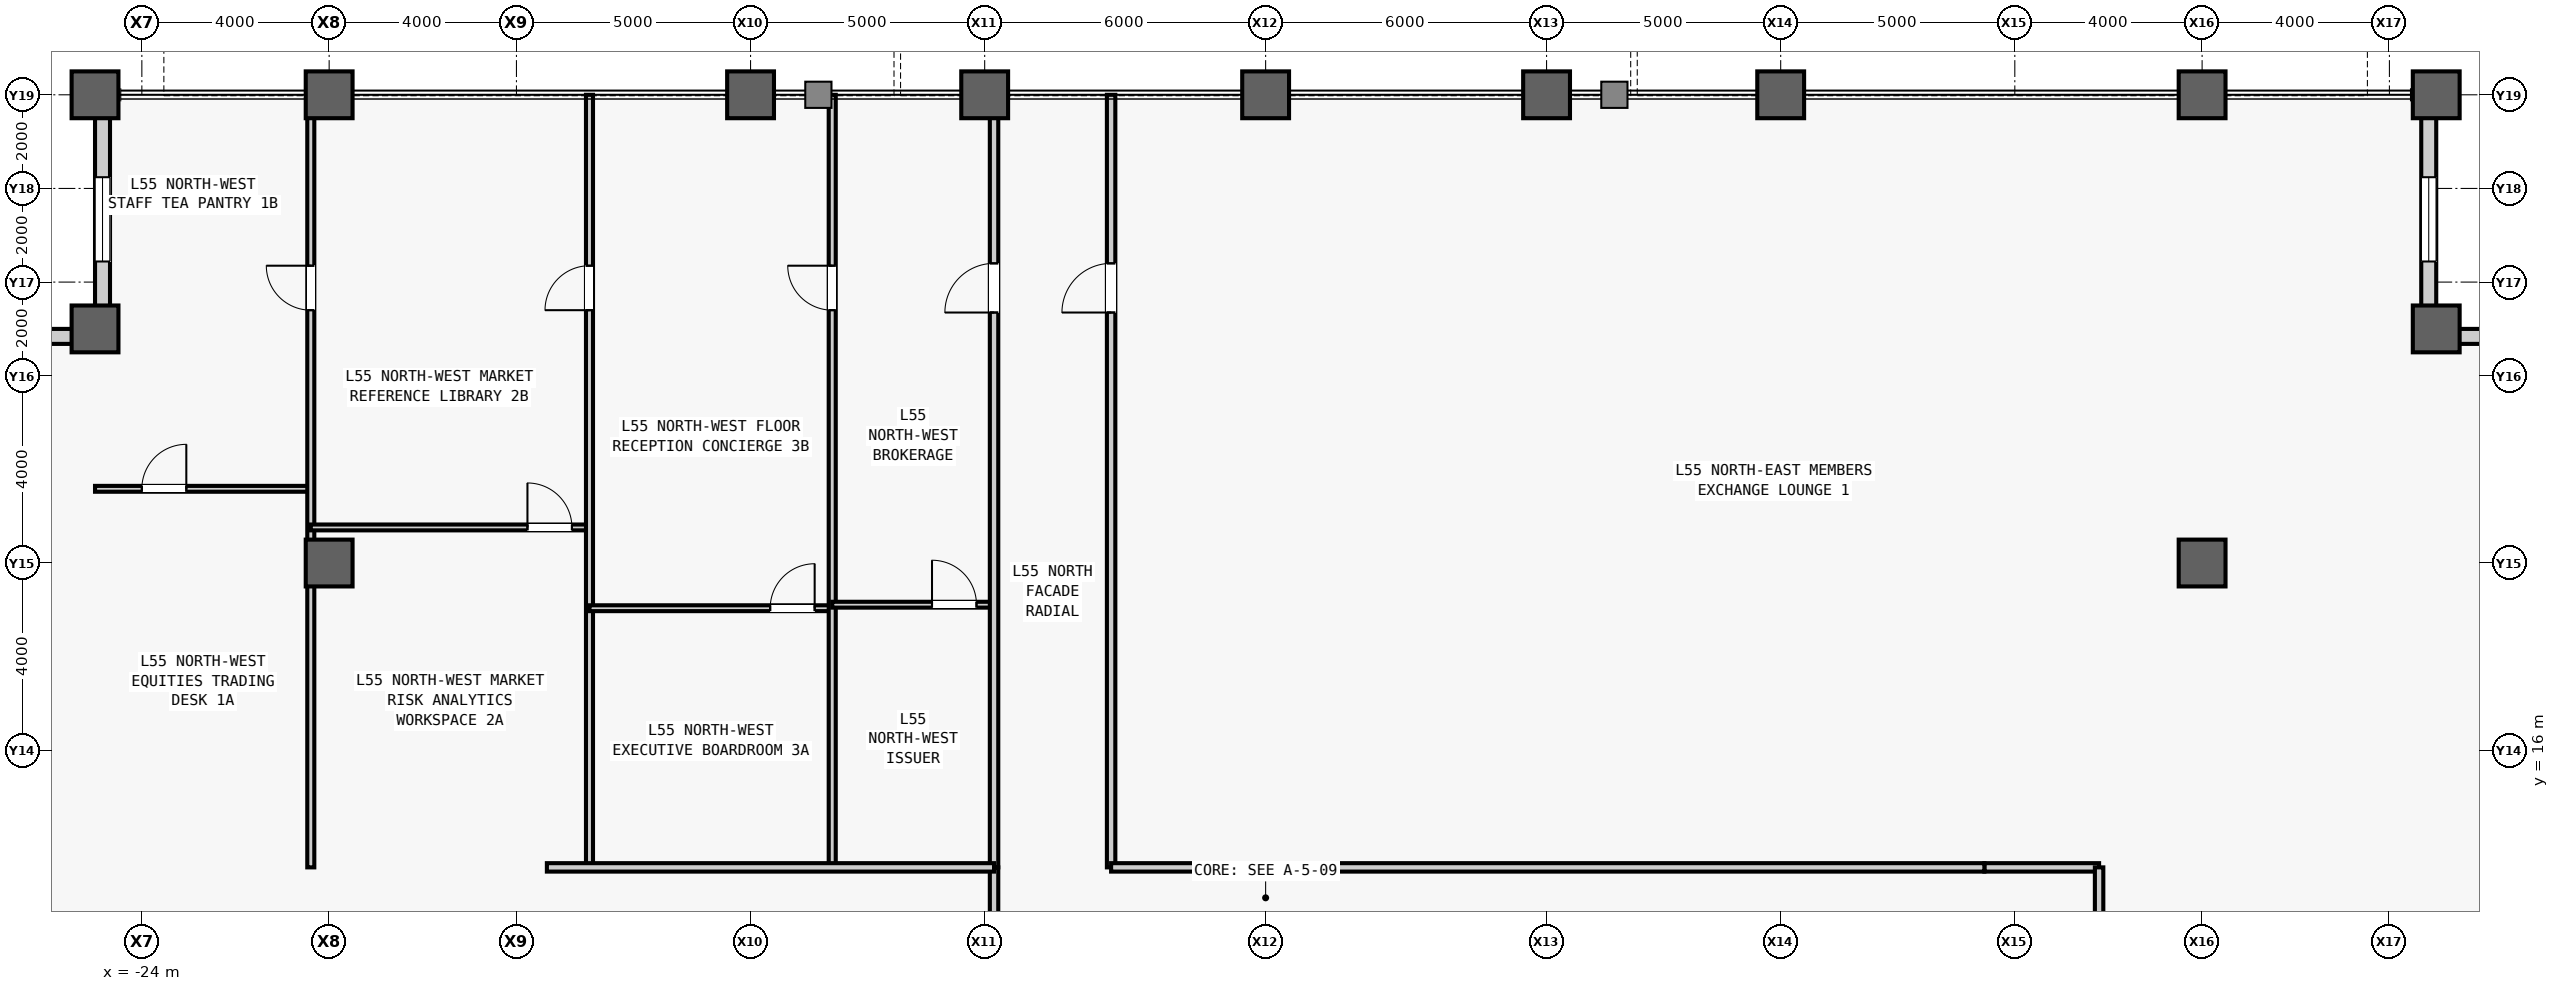
"""IFC4 building model, lengths in metres.
Left out: names, types, materials, properties, quantities, classifications, styles, units other than length and angle.
Written with IfcOpenShell. Run it as: python <this file> out.ifc"""

import sys

from ifc_helpers import new_model, si_unit, direction, frame, frame_2d, origin, origin_2d, place, context, subcontext, project, spatial, rectangle, hollow_rectangle, extrude, source, transform, mapped, element, fill, save


model = new_model("IFC4")
c1 = context("Model", 3, precision=1e-05, world=origin(), true_north=direction((0.0, 1.0)))
c2 = subcontext(c1, "Body", "Model", "MODEL_VIEW")
j1 = project(units=[si_unit("LENGTHUNIT", "METRE"), si_unit("PLANEANGLEUNIT", "RADIAN")], contexts=[c1])
p1 = place(None, origin())
s1 = spatial("IfcSite", under=j1, at=p1, CompositionType="ELEMENT")
p2 = place(p1, origin())
s2 = spatial("IfcBuilding", under=s1, at=p2, CompositionType="ELEMENT")
p3 = place(p2, frame((0.0, 0.0, 235.1)))
s3 = spatial("IfcBuildingStorey", under=s2, at=p3, CompositionType="ELEMENT", Elevation=235.1)
m1 = source(origin(), c2, "Body", "SweptSolid", [
    extrude(hollow_rectangle(XDim=1.0, YDim=1.0, WallThickness=0.055, at=origin_2d()), origin(), (0.0, 0.0, 1.0), 4.0),
])
for number, where, z_axis, x_axis in (
    (1, (-25.0, 25.0, 0.0), (0.0, 0.0, 1.0), (1.0, 0.0, 0.0)),
    (2, (-25.0, 30.0, 0.0), (0.0, 0.0, 1.0), (1.0, 0.0, 0.0)),
    (3, (-20.0, 20.0, 0.0), (0.0, 0.0, 1.0), (1.0, 0.0, 0.0)),
    (4, (-20.0, 30.0, 0.0), (0.0, 0.0, 1.0), (1.0, 0.0, 0.0)),
    (5, (-11.0, 30.0, 0.0), (0.0, 0.0, 1.0), (1.0, 0.0, 0.0)),
    (6, (-6.0, 30.0, 0.0), (0.0, 0.0, 1.0), (1.0, 0.0, 0.0)),
    (7, (0.0, 30.0, 0.0), (0.0, 0.0, 1.0), (1.0, 0.0, 0.0)),
    (8, (6.0, 30.0, 0.0), (0.0, 0.0, 1.0), (1.0, 0.0, 0.0)),
    (9, (11.0, 30.0, 0.0), (0.0, 0.0, 1.0), (1.0, 0.0, 0.0)),
    (10, (20.0, 20.0, 0.0), (0.0, 0.0, 1.0), (1.0, 0.0, 0.0)),
    (11, (20.0, 30.0, 0.0), (0.0, 0.0, 1.0), (1.0, 0.0, 0.0)),
    (12, (25.0, 25.0, 0.0), (0.0, 0.0, 1.0), (1.0, 0.0, 0.0)),
    (13, (25.0, 30.0, 0.0), (0.0, 0.0, 1.0), (1.0, 0.0, 0.0)),
):
    element("IfcColumn", number, at=place(p3, frame(where, z_axis=z_axis, x_axis=x_axis)), inside=s3, PredefinedType="COLUMN", context=c2, shape_type="MappedRepresentation", body=[
        mapped(m1, transform((0.0, 0.0, 0.0), scale=1.0)),
    ])
m2 = source(origin(), c2, "Body", "SweptSolid", [
    extrude(rectangle(XDim=4.68, YDim=0.32, at=frame_2d((2.34, 0.0))), origin(), (0.0, 0.0, 1.0), 3.164),
])
p4 = place(p3, frame((25.0, 24.84, 0.0), z_axis=(0.0, 0.0, 1.0), x_axis=(1.0, 0.0, 0.0)))
e14 = element("IfcWall", 14, at=p4, inside=s3, PredefinedType="STANDARD", context=c2, shape_type="MappedRepresentation", body=[
    mapped(m2, transform((0.0, 0.0, 0.0), scale=1.0)),
])
m3 = source(origin(), c2, "Body", "SweptSolid", [
    extrude(rectangle(XDim=1.8, YDim=2.4, at=frame_2d((0.9, 1.2))), frame((0.0, 0.17, 0.0), z_axis=(0.0, -1.0, 0.0), x_axis=(1.0, 0.0, 0.0)), (0.0, 0.0, 1.0), 0.34),
])
p5 = place(p4, frame((1.44, 0.0, 0.5)))
e15 = element("IfcOpeningElement", 15, at=p5, cuts=e14, PredefinedType="OPENING", context=c2, shape_type="MappedRepresentation", body=[
    mapped(m3, transform((0.0, 0.0, 0.0), scale=1.0)),
])
p6 = place(p3, frame((24.84, 25.0, 0.0), z_axis=(0.0, 0.0, 1.0), x_axis=(0.0, 1.0, 0.0)))
e16 = element("IfcWall", 16, at=p6, inside=s3, PredefinedType="STANDARD", context=c2, shape_type="MappedRepresentation", body=[
    mapped(m2, transform((0.0, 0.0, 0.0), scale=1.0)),
])
p7 = place(p6, frame((1.44, 0.0, 0.5)))
e17 = element("IfcOpeningElement", 17, at=p7, cuts=e16, PredefinedType="OPENING", context=c2, shape_type="MappedRepresentation", body=[
    mapped(m3, transform((0.0, 0.0, 0.0), scale=1.0)),
])
p8 = place(p3, frame((-24.84, 25.0, 0.0), z_axis=(0.0, 0.0, 1.0), x_axis=(0.0, 1.0, 0.0)))
e18 = element("IfcWall", 18, at=p8, inside=s3, PredefinedType="STANDARD", context=c2, shape_type="MappedRepresentation", body=[
    mapped(m2, transform((0.0, 0.0, 0.0), scale=1.0)),
])
p9 = place(p8, frame((1.44, 0.0, 0.5)))
e19 = element("IfcOpeningElement", 19, at=p9, cuts=e18, PredefinedType="OPENING", context=c2, shape_type="MappedRepresentation", body=[
    mapped(m3, transform((0.0, 0.0, 0.0), scale=1.0)),
])
p10 = place(p3, frame((-25.0, 24.84, 0.0), z_axis=(0.0, 0.0, 1.0), x_axis=(-1.0, 0.0, 0.0)))
e20 = element("IfcWall", 20, at=p10, inside=s3, PredefinedType="STANDARD", context=c2, shape_type="MappedRepresentation", body=[
    mapped(m2, transform((0.0, 0.0, 0.0), scale=1.0)),
])
p11 = place(p10, frame((1.44, 0.0, 0.5)))
e21 = element("IfcOpeningElement", 21, at=p11, cuts=e20, PredefinedType="OPENING", context=c2, shape_type="MappedRepresentation", body=[
    mapped(m3, transform((0.0, 0.0, 0.0), scale=1.0)),
])
m4 = source(origin(), c2, "Body", "SweptSolid", [
    extrude(rectangle(XDim=2.45, YDim=0.18, at=frame_2d((1.225, 0.0))), origin(), (0.0, 0.0, 1.0), 3.78),
])
p12 = place(p3, frame((15.35, 13.5, 0.0), z_axis=(0.0, 0.0, 1.0), x_axis=(1.0, 0.0, 0.0)))
e22 = element("IfcWall", 22, at=p12, inside=s3, PredefinedType="PARTITIONING", context=c2, shape_type="MappedRepresentation", body=[
    mapped(m4, transform((0.0, 0.0, 0.0), scale=1.0)),
])
m5 = source(origin(), c2, "Body", "SweptSolid", [
    extrude(rectangle(XDim=2.5, YDim=0.18, at=frame_2d((1.25, 0.0))), origin(), (0.0, 0.0, 1.0), 3.085),
])
p13 = place(p3, frame((-5.8, 11.0, 0.0), z_axis=(0.0, 0.0, 1.0), x_axis=(0.0, 1.0, 0.0)))
e23 = element("IfcWall", 23, at=p13, inside=s3, PredefinedType="PARTITIONING", context=c2, shape_type="MappedRepresentation", body=[
    mapped(m5, transform((0.0, 0.0, 0.0), scale=1.0)),
])
m6 = source(origin(), c2, "Body", "SweptSolid", [
    extrude(rectangle(XDim=4.608, YDim=0.125, at=frame_2d((2.304, 0.0))), origin(), (0.0, 0.0, 1.0), 3.78),
])
p14 = place(p3, frame((-25.0, 21.585, 0.0), z_axis=(0.0, 0.0, 1.0), x_axis=(1.0, 0.0, 0.0)))
e24 = element("IfcWall", 24, at=p14, inside=s3, PredefinedType="PARTITIONING", context=c2, shape_type="MappedRepresentation", body=[
    mapped(m6, transform((0.0, 0.0, 0.0), scale=1.0)),
])
m7 = source(origin(), c2, "Body", "SweptSolid", [
    extrude(rectangle(XDim=0.95, YDim=2.15, at=frame_2d((0.475, 1.075))), frame((0.0, 0.073, 0.0), z_axis=(0.0, -1.0, 0.0), x_axis=(1.0, 0.0, 0.0)), (0.0, 0.0, 1.0), 0.145),
])
p15 = place(p14, frame((1.0, 0.0, 0.0)))
e25 = element("IfcOpeningElement", 25, at=p15, cuts=e24, PredefinedType="OPENING", context=c2, shape_type="MappedRepresentation", body=[
    mapped(m7, transform((0.0, 0.0, 0.0), scale=1.0)),
])
m8 = source(origin(), c2, "Body", "SweptSolid", [
    extrude(rectangle(XDim=16.5, YDim=0.15, at=frame_2d((8.25, 0.0))), origin(), (0.0, 0.0, 1.0), 3.78),
])
p16 = place(p3, frame((-20.392, 13.5, 0.0), z_axis=(0.0, 0.0, 1.0), x_axis=(0.0, 1.0, 0.0)))
e26 = element("IfcWall", 26, at=p16, inside=s3, PredefinedType="PARTITIONING", context=c2, shape_type="MappedRepresentation", body=[
    mapped(m8, transform((0.0, 0.0, 0.0), scale=1.0)),
])
m9 = source(origin(), c2, "Body", "SweptSolid", [
    extrude(rectangle(XDim=0.95, YDim=2.15, at=frame_2d((0.475, 1.075))), frame((0.0, 0.085, 0.0), z_axis=(0.0, -1.0, 0.0), x_axis=(1.0, 0.0, 0.0)), (0.0, 0.0, 1.0), 0.17),
])
p17 = place(p16, frame((11.9, 0.0, 0.0)))
e27 = element("IfcOpeningElement", 27, at=p17, cuts=e26, PredefinedType="OPENING", context=c2, shape_type="MappedRepresentation", body=[
    mapped(m9, transform((0.0, 0.0, 0.0), scale=1.0)),
])
m10 = source(origin(), c2, "Body", "SweptSolid", [
    extrude(rectangle(XDim=5.952, YDim=0.125, at=frame_2d((2.976, 0.0))), origin(), (0.0, 0.0, 1.0), 3.78),
])
p18 = place(p3, frame((-20.392, 20.76, 0.0), z_axis=(0.0, 0.0, 1.0), x_axis=(1.0, 0.0, 0.0)))
e28 = element("IfcWall", 28, at=p18, inside=s3, PredefinedType="PARTITIONING", context=c2, shape_type="MappedRepresentation", body=[
    mapped(m10, transform((0.0, 0.0, 0.0), scale=1.0)),
])
p19 = place(p18, frame((4.627, 0.0, 0.0)))
e29 = element("IfcOpeningElement", 29, at=p19, cuts=e28, PredefinedType="OPENING", context=c2, shape_type="MappedRepresentation", body=[
    mapped(m7, transform((0.0, 0.0, 0.0), scale=1.0)),
])
p20 = place(p3, frame((-14.44, 13.5, 0.0), z_axis=(0.0, 0.0, 1.0), x_axis=(0.0, 1.0, 0.0)))
e30 = element("IfcWall", 30, at=p20, inside=s3, PredefinedType="PARTITIONING", context=c2, shape_type="MappedRepresentation", body=[
    mapped(m8, transform((0.0, 0.0, 0.0), scale=1.0)),
])
p21 = place(p20, frame((11.9, 0.0, 0.0)))
e31 = element("IfcOpeningElement", 31, at=p21, cuts=e30, PredefinedType="OPENING", context=c2, shape_type="MappedRepresentation", body=[
    mapped(m9, transform((0.0, 0.0, 0.0), scale=1.0)),
])
m11 = source(origin(), c2, "Body", "SweptSolid", [
    extrude(rectangle(XDim=5.184, YDim=0.125, at=frame_2d((2.592, 0.0))), origin(), (0.0, 0.0, 1.0), 3.78),
])
p22 = place(p3, frame((-14.44, 19.035, 0.0), z_axis=(0.0, 0.0, 1.0), x_axis=(1.0, 0.0, 0.0)))
e32 = element("IfcWall", 32, at=p22, inside=s3, PredefinedType="PARTITIONING", context=c2, shape_type="MappedRepresentation", body=[
    mapped(m11, transform((0.0, 0.0, 0.0), scale=1.0)),
])
p23 = place(p22, frame((3.859, 0.0, 0.0)))
e33 = element("IfcOpeningElement", 33, at=p23, cuts=e32, PredefinedType="OPENING", context=c2, shape_type="MappedRepresentation", body=[
    mapped(m7, transform((0.0, 0.0, 0.0), scale=1.0)),
])
p24 = place(p3, frame((-9.256, 13.5, 0.0), z_axis=(0.0, 0.0, 1.0), x_axis=(0.0, 1.0, 0.0)))
e34 = element("IfcWall", 34, at=p24, inside=s3, PredefinedType="PARTITIONING", context=c2, shape_type="MappedRepresentation", body=[
    mapped(m8, transform((0.0, 0.0, 0.0), scale=1.0)),
])
p25 = place(p24, frame((11.9, 0.0, 0.0)))
e35 = element("IfcOpeningElement", 35, at=p25, cuts=e34, PredefinedType="OPENING", context=c2, shape_type="MappedRepresentation", body=[
    mapped(m9, transform((0.0, 0.0, 0.0), scale=1.0)),
])
m12 = source(origin(), c2, "Body", "SweptSolid", [
    extrude(rectangle(XDim=3.456, YDim=0.125, at=frame_2d((1.728, 0.0))), origin(), (0.0, 0.0, 1.0), 3.78),
])
p26 = place(p3, frame((-9.256, 19.11, 0.0), z_axis=(0.0, 0.0, 1.0), x_axis=(1.0, 0.0, 0.0)))
e36 = element("IfcWall", 36, at=p26, inside=s3, PredefinedType="PARTITIONING", context=c2, shape_type="MappedRepresentation", body=[
    mapped(m12, transform((0.0, 0.0, 0.0), scale=1.0)),
])
p27 = place(p26, frame((2.131, 0.0, 0.0)))
e37 = element("IfcOpeningElement", 37, at=p27, cuts=e36, PredefinedType="OPENING", context=c2, shape_type="MappedRepresentation", body=[
    mapped(m7, transform((0.0, 0.0, 0.0), scale=1.0)),
])
m13 = source(origin(), c2, "Body", "SweptSolid", [
    extrude(rectangle(XDim=16.5, YDim=0.18, at=frame_2d((8.25, 0.0))), origin(), (0.0, 0.0, 1.0), 3.085),
])
p28 = place(p3, frame((-5.8, 13.5, 0.0), z_axis=(0.0, 0.0, 1.0), x_axis=(0.0, 1.0, 0.0)))
e38 = element("IfcWall", 38, at=p28, inside=s3, PredefinedType="PARTITIONING", context=c2, shape_type="MappedRepresentation", body=[
    mapped(m13, transform((0.0, 0.0, 0.0), scale=1.0)),
])
m14 = source(origin(), c2, "Body", "SweptSolid", [
    extrude(rectangle(XDim=1.05, YDim=2.2, at=frame_2d((0.525, 1.1))), frame((0.0, 0.1, 0.0), z_axis=(0.0, -1.0, 0.0), x_axis=(1.0, 0.0, 0.0)), (0.0, 0.0, 1.0), 0.2),
])
p29 = place(p28, frame((11.85, 0.0, 0.0)))
e39 = element("IfcOpeningElement", 39, at=p29, cuts=e38, PredefinedType="OPENING", context=c2, shape_type="MappedRepresentation", body=[
    mapped(m14, transform((0.0, 0.0, 0.0), scale=1.0)),
])
m15 = source(origin(), c2, "Body", "SweptSolid", [
    extrude(rectangle(XDim=9.55, YDim=0.18, at=frame_2d((4.775, 0.0))), origin(), (0.0, 0.0, 1.0), 3.78),
])
p30 = place(p3, frame((-15.35, 13.5, 0.0), z_axis=(0.0, 0.0, 1.0), x_axis=(1.0, 0.0, 0.0)))
e40 = element("IfcWall", 40, at=p30, inside=s3, PredefinedType="PARTITIONING", context=c2, shape_type="MappedRepresentation", body=[
    mapped(m15, transform((0.0, 0.0, 0.0), scale=1.0)),
])
m16 = source(origin(), c2, "Body", "SweptSolid", [
    extrude(rectangle(XDim=16.5, YDim=0.18, at=frame_2d((8.25, 0.0))), origin(), (0.0, 0.0, 1.0), 3.78),
])
p31 = place(p3, frame((-3.3, 13.5, 0.0), z_axis=(0.0, 0.0, 1.0), x_axis=(0.0, 1.0, 0.0)))
e41 = element("IfcWall", 41, at=p31, inside=s3, PredefinedType="PARTITIONING", context=c2, shape_type="MappedRepresentation", body=[
    mapped(m16, transform((0.0, 0.0, 0.0), scale=1.0)),
])
p32 = place(p31, frame((11.85, 0.0, 0.0)))
e42 = element("IfcOpeningElement", 42, at=p32, cuts=e41, PredefinedType="OPENING", context=c2, shape_type="MappedRepresentation", body=[
    mapped(m14, transform((0.0, 0.0, 0.0), scale=1.0)),
])
m17 = source(origin(), c2, "Body", "SweptSolid", [
    extrude(rectangle(XDim=18.65, YDim=0.18, at=frame_2d((9.325, 0.0))), origin(), (0.0, 0.0, 1.0), 3.78),
])
p33 = place(p3, frame((-3.3, 13.5, 0.0), z_axis=(0.0, 0.0, 1.0), x_axis=(1.0, 0.0, 0.0)))
e43 = element("IfcWall", 43, at=p33, inside=s3, PredefinedType="PARTITIONING", context=c2, shape_type="MappedRepresentation", body=[
    mapped(m17, transform((0.0, 0.0, 0.0), scale=1.0)),
])
m18 = source(origin(), c2, "Body", "SweptSolid", [
    extrude(rectangle(XDim=12.55, YDim=0.18, at=frame_2d((6.275, 0.0))), origin(), (0.0, 0.0, 1.0), 3.78),
])
p34 = place(p3, frame((17.8, 0.95, 0.0), z_axis=(0.0, 0.0, 1.0), x_axis=(0.0, 1.0, 0.0)))
e44 = element("IfcWall", 44, at=p34, inside=s3, PredefinedType="PARTITIONING", context=c2, shape_type="MappedRepresentation", body=[
    mapped(m18, transform((0.0, 0.0, 0.0), scale=1.0)),
])
m19 = source(origin(), c2, "Body", "SweptSolid", [
    extrude(rectangle(XDim=1.8, YDim=2.4, at=frame_2d((0.9, 1.2))), frame((0.0, 0.03, 0.0), z_axis=(0.0, -1.0, 0.0), x_axis=(1.0, 0.0, 0.0)), (0.0, 0.0, 1.0), 0.06),
])
p35 = place(p7, origin())
e45 = element("IfcWindow", 45, at=p35, inside=s3, PartitioningType="SINGLE_PANEL", PredefinedType="WINDOW", context=c2, shape_type="MappedRepresentation", body=[
    mapped(m19, transform((0.0, 0.0, 0.0), scale=1.0)),
])
fill(e17, e45)
p36 = place(p9, origin())
e46 = element("IfcWindow", 46, at=p36, inside=s3, PartitioningType="SINGLE_PANEL", PredefinedType="WINDOW", context=c2, shape_type="MappedRepresentation", body=[
    mapped(m19, transform((0.0, 0.0, 0.0), scale=1.0)),
])
fill(e19, e46)
m20 = source(origin(), c2, "Body", "SweptSolid", [
    extrude(rectangle(XDim=0.95, YDim=2.15, at=frame_2d((0.475, 1.075))), frame((0.0, 0.025, 0.0), z_axis=(0.0, -1.0, 0.0), x_axis=(1.0, 0.0, 0.0)), (0.0, 0.0, 1.0), 0.05),
])
p37 = place(p15, origin())
e47 = element("IfcDoor", 47, at=p37, inside=s3, OperationType="SINGLE_SWING_RIGHT", PredefinedType="DOOR", context=c2, shape_type="MappedRepresentation", body=[
    mapped(m20, transform((0.0, 0.0, 0.0), scale=1.0)),
])
fill(e25, e47)
p38 = place(p17, origin())
e48 = element("IfcDoor", 48, at=p38, inside=s3, OperationType="SINGLE_SWING_RIGHT", PredefinedType="DOOR", context=c2, shape_type="MappedRepresentation", body=[
    mapped(m20, transform((0.0, 0.0, 0.0), scale=1.0)),
])
fill(e27, e48)
p39 = place(p19, origin())
e49 = element("IfcDoor", 49, at=p39, inside=s3, OperationType="SINGLE_SWING_LEFT", PredefinedType="DOOR", context=c2, shape_type="MappedRepresentation", body=[
    mapped(m20, transform((0.0, 0.0, 0.0), scale=1.0)),
])
fill(e29, e49)
p40 = place(p21, origin())
e50 = element("IfcDoor", 50, at=p40, inside=s3, OperationType="SINGLE_SWING_LEFT", PredefinedType="DOOR", context=c2, shape_type="MappedRepresentation", body=[
    mapped(m20, transform((0.0, 0.0, 0.0), scale=1.0)),
])
fill(e31, e50)
p41 = place(p23, origin())
e51 = element("IfcDoor", 51, at=p41, inside=s3, OperationType="SINGLE_SWING_RIGHT", PredefinedType="DOOR", context=c2, shape_type="MappedRepresentation", body=[
    mapped(m20, transform((0.0, 0.0, 0.0), scale=1.0)),
])
fill(e33, e51)
p42 = place(p25, origin())
e52 = element("IfcDoor", 52, at=p42, inside=s3, OperationType="SINGLE_SWING_RIGHT", PredefinedType="DOOR", context=c2, shape_type="MappedRepresentation", body=[
    mapped(m20, transform((0.0, 0.0, 0.0), scale=1.0)),
])
fill(e35, e52)
p43 = place(p27, origin())
e53 = element("IfcDoor", 53, at=p43, inside=s3, OperationType="SINGLE_SWING_LEFT", PredefinedType="DOOR", context=c2, shape_type="MappedRepresentation", body=[
    mapped(m20, transform((0.0, 0.0, 0.0), scale=1.0)),
])
fill(e37, e53)
m21 = source(origin(), c2, "Body", "SweptSolid", [
    extrude(rectangle(XDim=1.05, YDim=2.2, at=frame_2d((0.525, 1.1))), frame((0.0, 0.025, 0.0), z_axis=(0.0, -1.0, 0.0), x_axis=(1.0, 0.0, 0.0)), (0.0, 0.0, 1.0), 0.05),
])
p44 = place(p29, origin())
e54 = element("IfcDoor", 54, at=p44, inside=s3, OperationType="SINGLE_SWING_LEFT", PredefinedType="DOOR", context=c2, shape_type="MappedRepresentation", body=[
    mapped(m21, transform((0.0, 0.0, 0.0), scale=1.0)),
])
fill(e39, e54)
p45 = place(p32, origin())
e55 = element("IfcDoor", 55, at=p45, inside=s3, OperationType="SINGLE_SWING_LEFT", PredefinedType="DOOR", context=c2, shape_type="MappedRepresentation", body=[
    mapped(m21, transform((0.0, 0.0, 0.0), scale=1.0)),
])
fill(e42, e55)
save(model, sys.argv[1])
